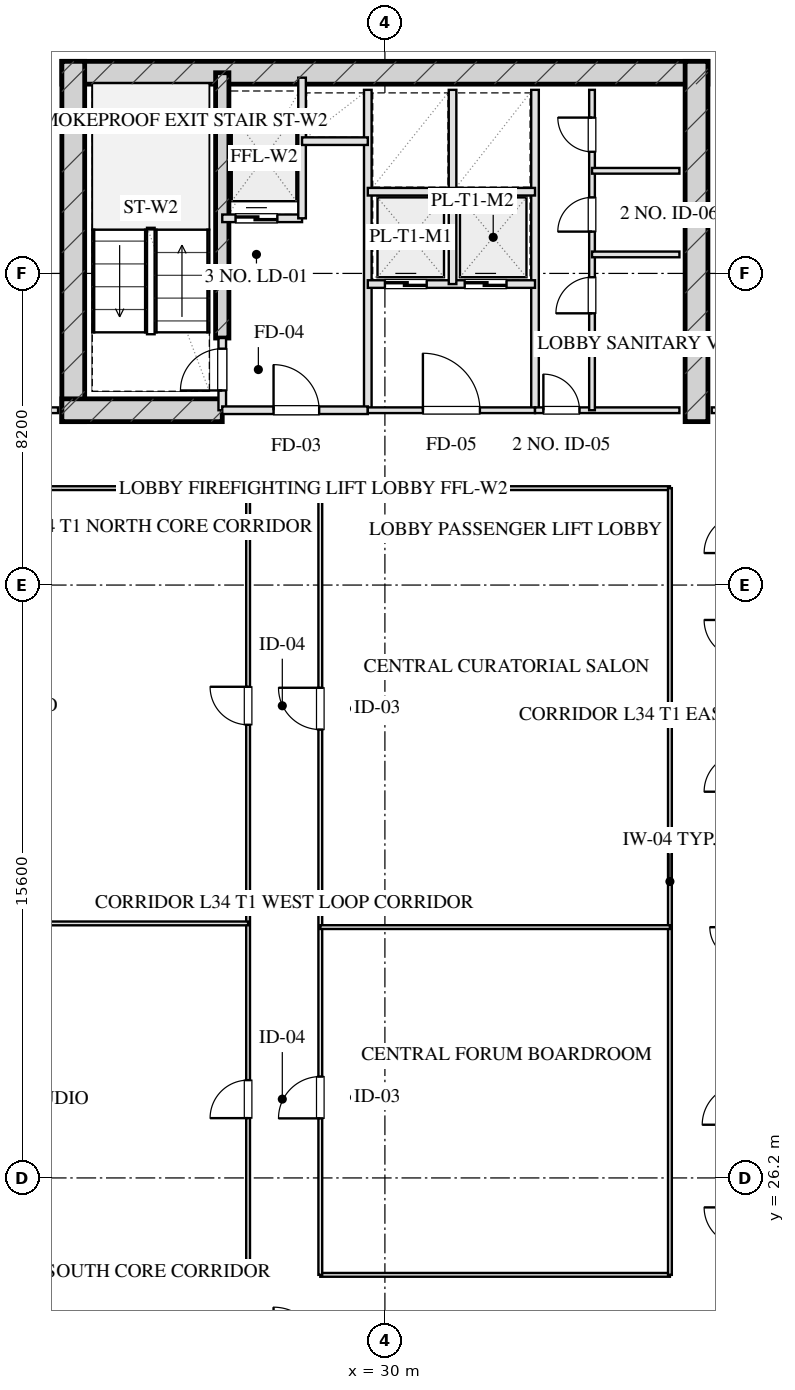
"""IFC4 building model, lengths in metres.
Left out: names, types, materials, properties, quantities, classifications, styles, units other than length and angle.
Written with IfcOpenShell. Run it as: python <this file> out.ifc"""

import sys

from ifc_helpers import new_model, si_unit, direction, frame, frame_2d, origin, place, context, subcontext, project, spatial, rectangle, extrude, element, fill, save


model = new_model("IFC4")
c1 = context("Model", 3, precision=1e-05, world=origin(), true_north=direction((0.0, 1.0)))
c2 = subcontext(c1, "Body", "Model", "MODEL_VIEW")
j1 = project(units=[si_unit("LENGTHUNIT", "METRE"), si_unit("PLANEANGLEUNIT", "RADIAN")], contexts=[c1])
p1 = place(None, origin())
s1 = spatial("IfcSite", under=j1, at=p1, CompositionType="ELEMENT")
p2 = place(p1, origin())
s2 = spatial("IfcBuilding", under=s1, at=p2, CompositionType="ELEMENT")
p3 = place(p2, frame((0.0, 0.0, 131.1)))
s3 = spatial("IfcBuildingStorey", under=s2, at=p3, CompositionType="ELEMENT", Elevation=131.1)
p4 = place(p3, frame((21.5, 55.28, 0.0), z_axis=(0.0, 0.0, 1.0), x_axis=(1.0, 0.0, 0.0)))
e1 = element("IfcWall", 1, at=p4, inside=s3, PredefinedType="SHEAR", context=c2, shape_type="SweptSolid", body=[
    extrude(rectangle(XDim=17.0, YDim=0.6, at=frame_2d((8.5, 0.0))), origin(), (0.0, 0.0, 1.0), 3.45),
])
for number, where, z_axis, x_axis in (
    (2, (21.8, 46.1, 0.0), (0.0, 0.0, 1.0), (0.0, 1.0, 0.0)),
    (3, (38.2, 46.1, 0.0), (0.0, 0.0, 1.0), (0.0, 1.0, 0.0)),
):
    element("IfcWall", number, at=place(p3, frame(where, z_axis=z_axis, x_axis=x_axis)), inside=s3, PredefinedType="SHEAR", context=c2, shape_type="SweptSolid", body=[
        extrude(rectangle(XDim=9.48, YDim=0.6, at=frame_2d((4.74, 0.0))), origin(), (0.0, 0.0, 1.0), 3.45),
    ])
p5 = place(p3, frame((25.72, 48.3, 0.0), z_axis=(0.0, 0.0, 1.0), x_axis=(0.0, 1.0, 0.0)))
e4 = element("IfcWall", 4, at=p5, inside=s3, PredefinedType="SHEAR", context=c2, shape_type="SweptSolid", body=[
    extrude(rectangle(XDim=6.98, YDim=0.35, at=frame_2d((3.49, 0.0))), origin(), (0.0, 0.0, 1.0), 3.45),
])
p6 = place(p3, frame((21.5, 46.4, 0.0), z_axis=(0.0, 0.0, 1.0), x_axis=(1.0, 0.0, 0.0)))
e5 = element("IfcWall", 5, at=p6, inside=s3, PredefinedType="SHEAR", context=c2, shape_type="SweptSolid", body=[
    extrude(rectangle(XDim=4.22, YDim=0.6, at=frame_2d((2.11, 0.0))), origin(), (0.0, 0.0, 1.0), 3.45),
])
p7 = place(p3, frame((25.72, 46.4, 0.0), z_axis=(0.0, 0.0, 1.0), x_axis=(0.0, 1.0, 0.0)))
e6 = element("IfcWall", 6, at=p7, inside=s3, PredefinedType="PARTITIONING", context=c2, shape_type="SweptSolid", body=[
    extrude(rectangle(XDim=1.9, YDim=0.2, at=frame_2d((0.95, 0.0))), origin(), (0.0, 0.0, 1.0), 3.175),
])
p8 = place(p7, frame((0.52, 0.0, 0.0)))
e7 = element("IfcOpeningElement", 7, at=p8, cuts=e6, PredefinedType="OPENING", context=c2, shape_type="SweptSolid", body=[
    extrude(rectangle(XDim=1.1, YDim=2.05, at=frame_2d((0.55, 1.025))), frame((0.0, 0.11, 0.0), z_axis=(0.0, -1.0, 0.0), x_axis=(1.0, 0.0, 0.0)), (0.0, 0.0, 1.0), 0.22),
])
p9 = place(p3, frame((29.55, 46.4, 0.0), z_axis=(0.0, 0.0, 1.0), x_axis=(0.0, 1.0, 0.0)))
e8 = element("IfcWall", 8, at=p9, inside=s3, PredefinedType="PARTITIONING", context=c2, shape_type="SweptSolid", body=[
    extrude(rectangle(XDim=8.43, YDim=0.2, at=frame_2d((4.215, 0.0))), origin(), (0.0, 0.0, 1.0), 3.175),
])
p10 = place(p3, frame((25.72, 46.4, 0.0), z_axis=(0.0, 0.0, 1.0), x_axis=(1.0, 0.0, 0.0)))
e9 = element("IfcWall", 9, at=p10, inside=s3, PredefinedType="PARTITIONING", context=c2, shape_type="SweptSolid", body=[
    extrude(rectangle(XDim=3.83, YDim=0.2, at=frame_2d((1.915, 0.0))), origin(), (0.0, 0.0, 1.0), 3.175),
])
p11 = place(p10, frame((1.35, 0.0, 0.0)))
e10 = element("IfcOpeningElement", 10, at=p11, cuts=e9, PredefinedType="OPENING", context=c2, shape_type="SweptSolid", body=[
    extrude(rectangle(XDim=1.2, YDim=2.05, at=frame_2d((0.6, 1.025))), frame((0.0, 0.11, 0.0), z_axis=(0.0, -1.0, 0.0), x_axis=(1.0, 0.0, 0.0)), (0.0, 0.0, 1.0), 0.22),
])
p12 = place(p3, frame((25.72, 51.45, 0.0), z_axis=(0.0, 0.0, 1.0), x_axis=(1.0, 0.0, 0.0)))
e11 = element("IfcWall", 11, at=p12, inside=s3, PredefinedType="PARTITIONING", context=c2, shape_type="SweptSolid", body=[
    extrude(rectangle(XDim=2.1, YDim=0.2, at=frame_2d((1.05, 0.0))), origin(), (0.0, 0.0, 1.0), 3.175),
])
p13 = place(p12, frame((0.35, 0.0, 0.0)))
e12 = element("IfcOpeningElement", 12, at=p13, cuts=e11, PredefinedType="OPENING", context=c2, shape_type="SweptSolid", body=[
    extrude(rectangle(XDim=1.1, YDim=2.05, at=frame_2d((0.55, 1.025))), frame((0.0, 0.11, 0.0), z_axis=(0.0, -1.0, 0.0), x_axis=(1.0, 0.0, 0.0)), (0.0, 0.0, 1.0), 0.22),
])
p14 = place(p3, frame((27.82, 51.45, 0.0), z_axis=(0.0, 0.0, 1.0), x_axis=(0.0, 1.0, 0.0)))
e13 = element("IfcWall", 13, at=p14, inside=s3, PredefinedType="PARTITIONING", context=c2, shape_type="SweptSolid", body=[
    extrude(rectangle(XDim=3.7, YDim=0.2, at=frame_2d((1.85, 0.0))), origin(), (0.0, 0.0, 1.0), 3.175),
])
p15 = place(p3, frame((27.82, 53.48, 0.0), z_axis=(0.0, 0.0, 1.0), x_axis=(1.0, 0.0, 0.0)))
e14 = element("IfcWall", 14, at=p15, inside=s3, PredefinedType="PARTITIONING", context=c2, shape_type="SweptSolid", body=[
    extrude(rectangle(XDim=1.73, YDim=0.2, at=frame_2d((0.865, 0.0))), origin(), (0.0, 0.0, 1.0), 3.175),
])
p16 = place(p3, frame((33.95, 46.4, 0.0), z_axis=(0.0, 0.0, 1.0), x_axis=(0.0, 1.0, 0.0)))
e15 = element("IfcWall", 15, at=p16, inside=s3, PredefinedType="PARTITIONING", context=c2, shape_type="SweptSolid", body=[
    extrude(rectangle(XDim=8.43, YDim=0.2, at=frame_2d((4.215, 0.0))), origin(), (0.0, 0.0, 1.0), 3.175),
])
p17 = place(p3, frame((29.55, 46.4, 0.0), z_axis=(0.0, 0.0, 1.0), x_axis=(1.0, 0.0, 0.0)))
e16 = element("IfcWall", 16, at=p17, inside=s3, PredefinedType="PARTITIONING", context=c2, shape_type="SweptSolid", body=[
    extrude(rectangle(XDim=4.4, YDim=0.15, at=frame_2d((2.2, 0.0))), origin(), (0.0, 0.0, 1.0), 3.175),
])
p18 = place(p17, frame((1.45, 0.0, 0.0)))
e17 = element("IfcOpeningElement", 17, at=p18, cuts=e16, PredefinedType="OPENING", context=c2, shape_type="SweptSolid", body=[
    extrude(rectangle(XDim=1.5, YDim=2.05, at=frame_2d((0.75, 1.025))), frame((0.0, 0.085, 0.0), z_axis=(0.0, -1.0, 0.0), x_axis=(1.0, 0.0, 0.0)), (0.0, 0.0, 1.0), 0.17),
])
p19 = place(p3, frame((29.55, 49.72, 0.0), z_axis=(0.0, 0.0, 1.0), x_axis=(1.0, 0.0, 0.0)))
e18 = element("IfcWall", 18, at=p19, inside=s3, PredefinedType="PARTITIONING", context=c2, shape_type="SweptSolid", body=[
    extrude(rectangle(XDim=4.4, YDim=0.2, at=frame_2d((2.2, 0.0))), origin(), (0.0, 0.0, 1.0), 3.175),
])
p20 = place(p19, frame((0.45, 0.0, 0.0)))
e19 = element("IfcOpeningElement", 19, at=p20, cuts=e18, PredefinedType="OPENING", context=c2, shape_type="SweptSolid", body=[
    extrude(rectangle(XDim=1.1, YDim=2.05, at=frame_2d((0.55, 1.025))), frame((0.0, 0.11, 0.0), z_axis=(0.0, -1.0, 0.0), x_axis=(1.0, 0.0, 0.0)), (0.0, 0.0, 1.0), 0.22),
])
p21 = place(p19, frame((2.55, 0.0, 0.0)))
e20 = element("IfcOpeningElement", 20, at=p21, cuts=e18, PredefinedType="OPENING", context=c2, shape_type="SweptSolid", body=[
    extrude(rectangle(XDim=1.1, YDim=2.05, at=frame_2d((0.55, 1.025))), frame((0.0, 0.11, 0.0), z_axis=(0.0, -1.0, 0.0), x_axis=(1.0, 0.0, 0.0)), (0.0, 0.0, 1.0), 0.22),
])
p22 = place(p3, frame((31.78, 49.72, 0.0), z_axis=(0.0, 0.0, 1.0), x_axis=(0.0, 1.0, 0.0)))
e21 = element("IfcWall", 21, at=p22, inside=s3, PredefinedType="PARTITIONING", context=c2, shape_type="SweptSolid", body=[
    extrude(rectangle(XDim=5.11, YDim=0.2, at=frame_2d((2.555, 0.0))), origin(), (0.0, 0.0, 1.0), 3.175),
])
p23 = place(p3, frame((29.55, 52.15, 0.0), z_axis=(0.0, 0.0, 1.0), x_axis=(1.0, 0.0, 0.0)))
e22 = element("IfcWall", 22, at=p23, inside=s3, PredefinedType="PARTITIONING", context=c2, shape_type="SweptSolid", body=[
    extrude(rectangle(XDim=4.4, YDim=0.2, at=frame_2d((2.2, 0.0))), origin(), (0.0, 0.0, 1.0), 3.175),
])
p24 = place(p3, frame((33.95, 46.4, 0.0), z_axis=(0.0, 0.0, 1.0), x_axis=(1.0, 0.0, 0.0)))
e23 = element("IfcWall", 23, at=p24, inside=s3, PredefinedType="PARTITIONING", context=c2, shape_type="SweptSolid", body=[
    extrude(rectangle(XDim=3.8, YDim=0.15, at=frame_2d((1.9, 0.0))), origin(), (0.0, 0.0, 1.0), 3.175),
])
p25 = place(p24, frame((0.22, 0.0, 0.0)))
e24 = element("IfcOpeningElement", 24, at=p25, cuts=e23, PredefinedType="OPENING", context=c2, shape_type="SweptSolid", body=[
    extrude(rectangle(XDim=0.95, YDim=2.05, at=frame_2d((0.475, 1.025))), frame((0.0, 0.085, 0.0), z_axis=(0.0, -1.0, 0.0), x_axis=(1.0, 0.0, 0.0)), (0.0, 0.0, 1.0), 0.17),
])
p26 = place(p3, frame((35.45, 46.4, 0.0), z_axis=(0.0, 0.0, 1.0), x_axis=(0.0, 1.0, 0.0)))
e25 = element("IfcWall", 25, at=p26, inside=s3, PredefinedType="PARTITIONING", context=c2, shape_type="SweptSolid", body=[
    extrude(rectangle(XDim=8.43, YDim=0.15, at=frame_2d((4.215, 0.0))), origin(), (0.0, 0.0, 1.0), 2.765),
])
p27 = place(p26, frame((2.55, 0.0, 0.0)))
e26 = element("IfcOpeningElement", 26, at=p27, cuts=e25, PredefinedType="OPENING", context=c2, shape_type="SweptSolid", body=[
    extrude(rectangle(XDim=0.95, YDim=2.05, at=frame_2d((0.475, 1.025))), frame((0.0, 0.085, 0.0), z_axis=(0.0, -1.0, 0.0), x_axis=(1.0, 0.0, 0.0)), (0.0, 0.0, 1.0), 0.17),
])
p28 = place(p26, frame((4.7, 0.0, 0.0)))
e27 = element("IfcOpeningElement", 27, at=p28, cuts=e25, PredefinedType="OPENING", context=c2, shape_type="SweptSolid", body=[
    extrude(rectangle(XDim=0.9, YDim=2.05, at=frame_2d((0.45, 1.025))), frame((0.0, 0.085, 0.0), z_axis=(0.0, -1.0, 0.0), x_axis=(1.0, 0.0, 0.0)), (0.0, 0.0, 1.0), 0.17),
])
p29 = place(p26, frame((6.8, 0.0, 0.0)))
e28 = element("IfcOpeningElement", 28, at=p29, cuts=e25, PredefinedType="OPENING", context=c2, shape_type="SweptSolid", body=[
    extrude(rectangle(XDim=0.9, YDim=2.05, at=frame_2d((0.45, 1.025))), frame((0.0, 0.085, 0.0), z_axis=(0.0, -1.0, 0.0), x_axis=(1.0, 0.0, 0.0)), (0.0, 0.0, 1.0), 0.17),
])
for number, where, z_axis, x_axis in (
    (29, (35.45, 50.5, 0.0), (0.0, 0.0, 1.0), (1.0, 0.0, 0.0)),
    (30, (35.45, 52.7, 0.0), (0.0, 0.0, 1.0), (1.0, 0.0, 0.0)),
):
    element("IfcWall", number, at=place(p3, frame(where, z_axis=z_axis, x_axis=x_axis)), inside=s3, PredefinedType="PARTITIONING", context=c2, shape_type="SweptSolid", body=[
        extrude(rectangle(XDim=2.3, YDim=0.15, at=frame_2d((1.15, 0.0))), origin(), (0.0, 0.0, 1.0), 3.175),
    ])
p30 = place(p3, frame((11.4, 46.4, 0.0), z_axis=(0.0, 0.0, 1.0), x_axis=(1.0, 0.0, 0.0)))
e31 = element("IfcWall", 31, at=p30, inside=s3, PredefinedType="PARTITIONING", context=c2, shape_type="SweptSolid", body=[
    extrude(rectangle(XDim=10.0, YDim=0.15, at=frame_2d((5.0, 0.0))), origin(), (0.0, 0.0, 1.0), 3.175),
])
p31 = place(p30, frame((4.2, 0.0, 0.0)))
e32 = element("IfcOpeningElement", 32, at=p31, cuts=e31, PredefinedType="OPENING", context=c2, shape_type="SweptSolid", body=[
    extrude(rectangle(XDim=1.05, YDim=2.05, at=frame_2d((0.525, 1.025))), frame((0.0, 0.085, 0.0), z_axis=(0.0, -1.0, 0.0), x_axis=(1.0, 0.0, 0.0)), (0.0, 0.0, 1.0), 0.17),
])
p32 = place(p3, frame((38.6, 46.4, 0.0), z_axis=(0.0, 0.0, 1.0), x_axis=(1.0, 0.0, 0.0)))
e33 = element("IfcWall", 33, at=p32, inside=s3, PredefinedType="PARTITIONING", context=c2, shape_type="SweptSolid", body=[
    extrude(rectangle(XDim=10.0, YDim=0.15, at=frame_2d((5.0, 0.0))), origin(), (0.0, 0.0, 1.0), 3.175),
])
p33 = place(p32, frame((4.2, 0.0, 0.0)))
e34 = element("IfcOpeningElement", 34, at=p33, cuts=e33, PredefinedType="OPENING", context=c2, shape_type="SweptSolid", body=[
    extrude(rectangle(XDim=1.0, YDim=2.05, at=frame_2d((0.5, 1.025))), frame((0.0, 0.085, 0.0), z_axis=(0.0, -1.0, 0.0), x_axis=(1.0, 0.0, 0.0)), (0.0, 0.0, 1.0), 0.17),
])
p34 = place(p3, frame((11.4, 23.65, 0.0), z_axis=(0.0, 0.0, 1.0), x_axis=(1.0, 0.0, 0.0)))
e35 = element("IfcWall", 35, at=p34, inside=s3, PredefinedType="MOVABLE", context=c2, shape_type="SweptSolid", body=[
    extrude(rectangle(XDim=15.0, YDim=0.1, at=frame_2d((7.5, 0.0))), origin(), (0.0, 0.0, 1.0), 3.175),
])
p35 = place(p3, frame((28.3, 23.65, 0.0), z_axis=(0.0, 0.0, 1.0), x_axis=(1.0, 0.0, 0.0)))
e36 = element("IfcWall", 36, at=p35, inside=s3, PredefinedType="MOVABLE", context=c2, shape_type="SweptSolid", body=[
    extrude(rectangle(XDim=9.2, YDim=0.1, at=frame_2d((4.6, 0.0))), origin(), (0.0, 0.0, 1.0), 3.175),
])
p36 = place(p3, frame((11.4, 44.35, 0.0), z_axis=(0.0, 0.0, 1.0), x_axis=(1.0, 0.0, 0.0)))
e37 = element("IfcWall", 37, at=p36, inside=s3, PredefinedType="MOVABLE", context=c2, shape_type="SweptSolid", body=[
    extrude(rectangle(XDim=15.0, YDim=0.1, at=frame_2d((7.5, 0.0))), origin(), (0.0, 0.0, 1.0), 3.175),
])
p37 = place(p3, frame((28.3, 44.35, 0.0), z_axis=(0.0, 0.0, 1.0), x_axis=(1.0, 0.0, 0.0)))
e38 = element("IfcWall", 38, at=p37, inside=s3, PredefinedType="MOVABLE", context=c2, shape_type="SweptSolid", body=[
    extrude(rectangle(XDim=9.2, YDim=0.1, at=frame_2d((4.6, 0.0))), origin(), (0.0, 0.0, 1.0), 3.175),
])
p38 = place(p3, frame((26.4, 23.65, 0.0), z_axis=(0.0, 0.0, 1.0), x_axis=(0.0, 1.0, 0.0)))
e39 = element("IfcWall", 39, at=p38, inside=s3, PredefinedType="MOVABLE", context=c2, shape_type="SweptSolid", body=[
    extrude(rectangle(XDim=20.7, YDim=0.1, at=frame_2d((10.35, 0.0))), origin(), (0.0, 0.0, 1.0), 3.175),
])
p39 = place(p38, frame((4.124, 0.0, 0.0)))
e40 = element("IfcOpeningElement", 40, at=p39, cuts=e39, PredefinedType="OPENING", context=c2, shape_type="SweptSolid", body=[
    extrude(rectangle(XDim=1.0, YDim=2.05, at=frame_2d((0.5, 1.025))), frame((0.0, 0.06, 0.0), z_axis=(0.0, -1.0, 0.0), x_axis=(1.0, 0.0, 0.0)), (0.0, 0.0, 1.0), 0.12),
])
p40 = place(p38, frame((14.473, 0.0, 0.0)))
e41 = element("IfcOpeningElement", 41, at=p40, cuts=e39, PredefinedType="OPENING", context=c2, shape_type="SweptSolid", body=[
    extrude(rectangle(XDim=1.0, YDim=2.05, at=frame_2d((0.5, 1.025))), frame((0.0, 0.06, 0.0), z_axis=(0.0, -1.0, 0.0), x_axis=(1.0, 0.0, 0.0)), (0.0, 0.0, 1.0), 0.12),
])
p41 = place(p3, frame((28.3, 23.65, 0.0), z_axis=(0.0, 0.0, 1.0), x_axis=(0.0, 1.0, 0.0)))
e42 = element("IfcWall", 42, at=p41, inside=s3, PredefinedType="MOVABLE", context=c2, shape_type="SweptSolid", body=[
    extrude(rectangle(XDim=20.7, YDim=0.1, at=frame_2d((10.35, 0.0))), origin(), (0.0, 0.0, 1.0), 3.175),
])
p42 = place(p41, frame((4.117, 0.0, 0.0)))
e43 = element("IfcOpeningElement", 43, at=p42, cuts=e42, PredefinedType="OPENING", context=c2, shape_type="SweptSolid", body=[
    extrude(rectangle(XDim=1.1, YDim=2.05, at=frame_2d((0.55, 1.025))), frame((0.0, 0.06, 0.0), z_axis=(0.0, -1.0, 0.0), x_axis=(1.0, 0.0, 0.0)), (0.0, 0.0, 1.0), 0.12),
])
p43 = place(p41, frame((14.347, 0.0, 0.0)))
e44 = element("IfcOpeningElement", 44, at=p43, cuts=e42, PredefinedType="OPENING", context=c2, shape_type="SweptSolid", body=[
    extrude(rectangle(XDim=1.1, YDim=2.05, at=frame_2d((0.55, 1.025))), frame((0.0, 0.06, 0.0), z_axis=(0.0, -1.0, 0.0), x_axis=(1.0, 0.0, 0.0)), (0.0, 0.0, 1.0), 0.12),
])
p44 = place(p3, frame((37.5, 23.65, 0.0), z_axis=(0.0, 0.0, 1.0), x_axis=(0.0, 1.0, 0.0)))
e45 = element("IfcWall", 45, at=p44, inside=s3, PredefinedType="MOVABLE", context=c2, shape_type="SweptSolid", body=[
    extrude(rectangle(XDim=20.7, YDim=0.1, at=frame_2d((10.35, 0.0))), origin(), (0.0, 0.0, 1.0), 3.175),
])
p45 = place(p3, frame((28.3, 32.8, 0.0), z_axis=(0.0, 0.0, 1.0), x_axis=(1.0, 0.0, 0.0)))
e46 = element("IfcWall", 46, at=p45, inside=s3, PredefinedType="MOVABLE", context=c2, shape_type="SweptSolid", body=[
    extrude(rectangle(XDim=9.2, YDim=0.1, at=frame_2d((4.6, 0.0))), origin(), (0.0, 0.0, 1.0), 3.175),
])
p46 = place(p3, frame((11.4, 32.897, 0.0), z_axis=(0.0, 0.0, 1.0), x_axis=(1.0, 0.0, 0.0)))
e47 = element("IfcWall", 47, at=p46, inside=s3, PredefinedType="MOVABLE", context=c2, shape_type="SweptSolid", body=[
    extrude(rectangle(XDim=15.0, YDim=0.1, at=frame_2d((7.5, 0.0))), origin(), (0.0, 0.0, 1.0), 3.175),
])
p47 = place(p8, origin())
e48 = element("IfcDoor", 48, at=p47, inside=s3, OperationType="SINGLE_SWING_LEFT", PredefinedType="DOOR", context=c2, shape_type="SweptSolid", body=[
    extrude(rectangle(XDim=1.1, YDim=2.05, at=frame_2d((0.55, 1.025))), frame((0.0, 0.025, 0.0), z_axis=(0.0, -1.0, 0.0), x_axis=(1.0, 0.0, 0.0)), (0.0, 0.0, 1.0), 0.05),
])
fill(e7, e48)
p48 = place(p11, origin())
e49 = element("IfcDoor", 49, at=p48, inside=s3, OperationType="SINGLE_SWING_LEFT", PredefinedType="DOOR", context=c2, shape_type="SweptSolid", body=[
    extrude(rectangle(XDim=1.2, YDim=2.05, at=frame_2d((0.6, 1.025))), frame((0.0, 0.025, 0.0), z_axis=(0.0, -1.0, 0.0), x_axis=(1.0, 0.0, 0.0)), (0.0, 0.0, 1.0), 0.05),
])
fill(e10, e49)
p49 = place(p13, origin())
e50 = element("IfcDoor", 50, at=p49, inside=s3, OperationType="DOUBLE_DOOR_SLIDING", PredefinedType="DOOR", context=c2, shape_type="SweptSolid", body=[
    extrude(rectangle(XDim=1.1, YDim=2.05, at=frame_2d((0.55, 1.025))), frame((0.0, 0.025, 0.0), z_axis=(0.0, -1.0, 0.0), x_axis=(1.0, 0.0, 0.0)), (0.0, 0.0, 1.0), 0.05),
])
fill(e12, e50)
p50 = place(p18, origin())
e51 = element("IfcDoor", 51, at=p50, inside=s3, OperationType="SINGLE_SWING_LEFT", PredefinedType="DOOR", context=c2, shape_type="SweptSolid", body=[
    extrude(rectangle(XDim=1.5, YDim=2.05, at=frame_2d((0.75, 1.025))), frame((0.0, 0.025, 0.0), z_axis=(0.0, -1.0, 0.0), x_axis=(1.0, 0.0, 0.0)), (0.0, 0.0, 1.0), 0.05),
])
fill(e17, e51)
p51 = place(p20, origin())
e52 = element("IfcDoor", 52, at=p51, inside=s3, OperationType="DOUBLE_DOOR_SLIDING", PredefinedType="DOOR", context=c2, shape_type="SweptSolid", body=[
    extrude(rectangle(XDim=1.1, YDim=2.05, at=frame_2d((0.55, 1.025))), frame((0.0, 0.025, 0.0), z_axis=(0.0, -1.0, 0.0), x_axis=(1.0, 0.0, 0.0)), (0.0, 0.0, 1.0), 0.05),
])
fill(e19, e52)
p52 = place(p21, origin())
e53 = element("IfcDoor", 53, at=p52, inside=s3, OperationType="DOUBLE_DOOR_SLIDING", PredefinedType="DOOR", context=c2, shape_type="SweptSolid", body=[
    extrude(rectangle(XDim=1.1, YDim=2.05, at=frame_2d((0.55, 1.025))), frame((0.0, 0.025, 0.0), z_axis=(0.0, -1.0, 0.0), x_axis=(1.0, 0.0, 0.0)), (0.0, 0.0, 1.0), 0.05),
])
fill(e20, e53)
p53 = place(p25, origin())
e54 = element("IfcDoor", 54, at=p53, inside=s3, OperationType="SINGLE_SWING_LEFT", PredefinedType="DOOR", context=c2, shape_type="SweptSolid", body=[
    extrude(rectangle(XDim=0.95, YDim=2.05, at=frame_2d((0.475, 1.025))), frame((0.0, 0.025, 0.0), z_axis=(0.0, -1.0, 0.0), x_axis=(1.0, 0.0, 0.0)), (0.0, 0.0, 1.0), 0.05),
])
fill(e24, e54)
p54 = place(p27, origin())
e55 = element("IfcDoor", 55, at=p54, inside=s3, OperationType="SINGLE_SWING_LEFT", PredefinedType="DOOR", context=c2, shape_type="SweptSolid", body=[
    extrude(rectangle(XDim=0.95, YDim=2.05, at=frame_2d((0.475, 1.025))), frame((0.0, 0.025, 0.0), z_axis=(0.0, -1.0, 0.0), x_axis=(1.0, 0.0, 0.0)), (0.0, 0.0, 1.0), 0.05),
])
fill(e26, e55)
p55 = place(p28, origin())
e56 = element("IfcDoor", 56, at=p55, inside=s3, OperationType="SINGLE_SWING_LEFT", PredefinedType="DOOR", context=c2, shape_type="SweptSolid", body=[
    extrude(rectangle(XDim=0.9, YDim=2.05, at=frame_2d((0.45, 1.025))), frame((0.0, 0.025, 0.0), z_axis=(0.0, -1.0, 0.0), x_axis=(1.0, 0.0, 0.0)), (0.0, 0.0, 1.0), 0.05),
])
fill(e27, e56)
p56 = place(p29, origin())
e57 = element("IfcDoor", 57, at=p56, inside=s3, OperationType="SINGLE_SWING_RIGHT", PredefinedType="DOOR", context=c2, shape_type="SweptSolid", body=[
    extrude(rectangle(XDim=0.9, YDim=2.05, at=frame_2d((0.45, 1.025))), frame((0.0, 0.025, 0.0), z_axis=(0.0, -1.0, 0.0), x_axis=(1.0, 0.0, 0.0)), (0.0, 0.0, 1.0), 0.05),
])
fill(e28, e57)
p57 = place(p39, origin())
e58 = element("IfcDoor", 58, at=p57, inside=s3, OperationType="SINGLE_SWING_LEFT", PredefinedType="DOOR", context=c2, shape_type="SweptSolid", body=[
    extrude(rectangle(XDim=1.0, YDim=2.05, at=frame_2d((0.5, 1.025))), frame((0.0, 0.025, 0.0), z_axis=(0.0, -1.0, 0.0), x_axis=(1.0, 0.0, 0.0)), (0.0, 0.0, 1.0), 0.05),
])
fill(e40, e58)
p58 = place(p40, origin())
e59 = element("IfcDoor", 59, at=p58, inside=s3, OperationType="SINGLE_SWING_RIGHT", PredefinedType="DOOR", context=c2, shape_type="SweptSolid", body=[
    extrude(rectangle(XDim=1.0, YDim=2.05, at=frame_2d((0.5, 1.025))), frame((0.0, 0.025, 0.0), z_axis=(0.0, -1.0, 0.0), x_axis=(1.0, 0.0, 0.0)), (0.0, 0.0, 1.0), 0.05),
])
fill(e41, e59)
p59 = place(p42, origin())
e60 = element("IfcDoor", 60, at=p59, inside=s3, OperationType="SINGLE_SWING_LEFT", PredefinedType="DOOR", context=c2, shape_type="SweptSolid", body=[
    extrude(rectangle(XDim=1.1, YDim=2.05, at=frame_2d((0.55, 1.025))), frame((0.0, 0.025, 0.0), z_axis=(0.0, -1.0, 0.0), x_axis=(1.0, 0.0, 0.0)), (0.0, 0.0, 1.0), 0.05),
])
fill(e43, e60)
p60 = place(p43, origin())
e61 = element("IfcDoor", 61, at=p60, inside=s3, OperationType="SINGLE_SWING_RIGHT", PredefinedType="DOOR", context=c2, shape_type="SweptSolid", body=[
    extrude(rectangle(XDim=1.1, YDim=2.05, at=frame_2d((0.55, 1.025))), frame((0.0, 0.025, 0.0), z_axis=(0.0, -1.0, 0.0), x_axis=(1.0, 0.0, 0.0)), (0.0, 0.0, 1.0), 0.05),
])
fill(e44, e61)
save(model, sys.argv[1])
